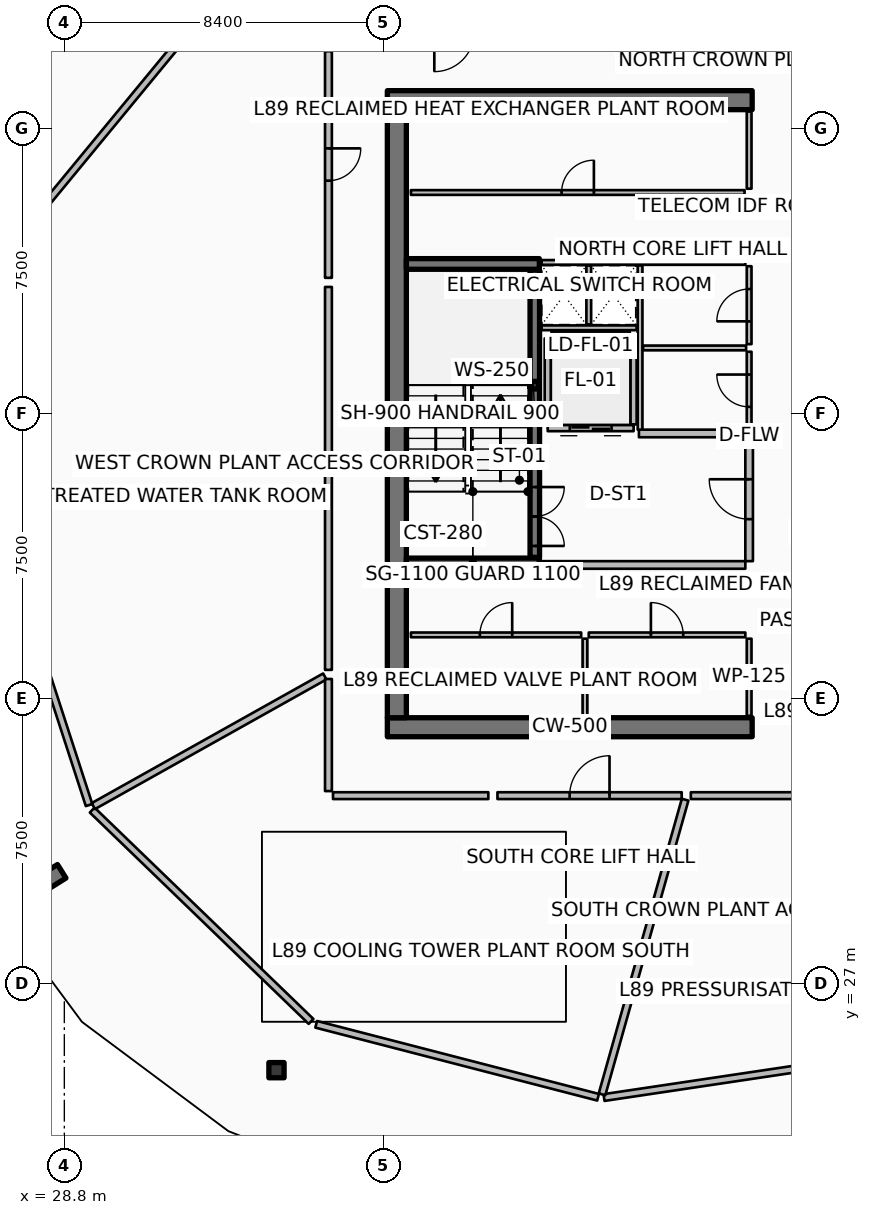
"""IFC4 building model, lengths in metres.
Left out: names, types, materials, properties, quantities, classifications, styles, units other than length and angle.
Written with IfcOpenShell. Run it as: python <this file> out.ifc"""

import sys

from ifc_helpers import new_model, si_unit, direction, frame, frame_2d, origin, origin_2d, place, context, subcontext, project, spatial, rectangle, hollow_rectangle, extrude, element, fill, save


model = new_model("IFC4")
c1 = context("Model", 3, precision=1e-05, world=origin(), true_north=direction((0.0, 1.0)))
c2 = subcontext(c1, "Body", "Model", "MODEL_VIEW")
j1 = project(units=[si_unit("LENGTHUNIT", "METRE"), si_unit("PLANEANGLEUNIT", "RADIAN")], contexts=[c1])
p1 = place(None, origin())
s1 = spatial("IfcSite", under=j1, at=p1, CompositionType="ELEMENT")
p2 = place(p1, origin())
s2 = spatial("IfcBuilding", under=s1, at=p2, CompositionType="ELEMENT")
p3 = place(p2, frame((0.0, 0.0, 356.0)))
s3 = spatial("IfcBuildingStorey", under=s2, at=p3, CompositionType="ELEMENT", Elevation=356.0)
for number, where, z_axis, x_axis in (
    (1, (37.3, 33.75, 0.0), (0.0, 0.0, 1.0), (1.0, 0.0, 0.0)),
    (2, (37.3, 50.25, 0.0), (0.0, 0.0, 1.0), (1.0, 0.0, 0.0)),
):
    element("IfcWall", number, at=place(p3, frame(where, z_axis=z_axis, x_axis=x_axis)), inside=s3, PredefinedType="SHEAR", context=c2, shape_type="SweptSolid", body=[
        extrude(rectangle(XDim=9.6, YDim=0.5, at=frame_2d((4.8, 0.0))), origin(), (0.0, 0.0, 1.0), 3.6),
    ])
p4 = place(p3, frame((37.55, 34.0, 0.0), z_axis=(0.0, 0.0, 1.0), x_axis=(0.0, 1.0, 0.0)))
e3 = element("IfcWall", 3, at=p4, inside=s3, PredefinedType="SHEAR", context=c2, shape_type="SweptSolid", body=[
    extrude(rectangle(XDim=16.0, YDim=0.5, at=frame_2d((8.0, 0.0))), origin(), (0.0, 0.0, 1.0), 3.6),
])
for number, where, z_axis, x_axis in (
    (4, (37.8, 38.06, 0.0), (0.0, 0.0, 1.0), (1.0, 0.0, 0.0)),
    (5, (37.8, 45.94, 0.0), (0.0, 0.0, 1.0), (1.0, 0.0, 0.0)),
):
    element("IfcWall", number, at=place(p3, frame(where, z_axis=z_axis, x_axis=x_axis)), inside=s3, PredefinedType="SHEAR", context=c2, shape_type="SweptSolid", body=[
        extrude(rectangle(XDim=3.5, YDim=0.28, at=frame_2d((1.75, 0.0))), origin(), (0.0, 0.0, 1.0), 3.6),
    ])
p5 = place(p3, frame((41.18, 42.75, 0.0), z_axis=(0.0, 0.0, 1.0), x_axis=(1.0, 0.0, 0.0)))
e6 = element("IfcColumn", 6, at=p5, inside=s3, PredefinedType="COLUMN", context=c2, shape_type="SweptSolid", body=[
    extrude(hollow_rectangle(XDim=0.2, YDim=0.2, WallThickness=0.01, InnerFilletRadius=0.01, OuterFilletRadius=0.02, at=origin_2d()), origin(), (0.0, 0.0, 1.0), 1.595),
])
p6 = place(p3, frame((28.731, 29.959, 0.0), z_axis=(0.0, 0.0, 1.0), x_axis=(-0.848033572426, -0.529942506352, 0.0)))
e7 = element("IfcWall", 7, at=p6, inside=s3, PredefinedType="SOLIDWALL", context=c2, shape_type="SweptSolid", body=[
    extrude(rectangle(XDim=3.5, YDim=0.42, at=frame_2d((1.75, 0.0))), origin(), (0.0, 0.0, 1.0), 3.6),
])
p7 = place(p3, frame((34.383, 24.726, 0.0), z_axis=(0.0, 0.0, 1.0), x_axis=(1.0, 0.0, 0.0)))
e8 = element("IfcColumn", 8, at=p7, inside=s3, PredefinedType="COLUMN", context=c2, shape_type="SweptSolid", body=[
    extrude(hollow_rectangle(XDim=0.4, YDim=0.4, WallThickness=0.02, InnerFilletRadius=0.02, OuterFilletRadius=0.04, at=origin_2d()), origin(), (0.0, 0.0, 1.0), 3.32),
])
p8 = place(p3, frame((41.18, 38.22, 0.0), z_axis=(0.0, 0.0, 1.0), x_axis=(0.0, 1.0, 0.0)))
e9 = element("IfcWall", 9, at=p8, inside=s3, PredefinedType="SOLIDWALL", context=c2, shape_type="SweptSolid", body=[
    extrude(rectangle(XDim=7.56, YDim=0.25, at=frame_2d((3.78, 0.0))), origin(), (0.0, 0.0, 1.0), 3.32),
])
p9 = place(p8, frame((0.3, 0.0, 0.0)))
e10 = element("IfcOpeningElement", 10, at=p9, cuts=e9, PredefinedType="OPENING", context=c2, shape_type="SweptSolid", body=[
    extrude(rectangle(XDim=1.55, YDim=2.15, at=frame_2d((0.775, 1.075))), frame((0.0, 0.135, 0.0), z_axis=(0.0, -1.0, 0.0), x_axis=(1.0, 0.0, 0.0)), (0.0, 0.0, 1.0), 0.27),
])
p10 = place(p3, frame((43.78, 41.62, 0.0), z_axis=(0.0, 0.0, 1.0), x_axis=(-1.0, 0.0, 0.0)))
e11 = element("IfcWall", 11, at=p10, inside=s3, PredefinedType="PARTITIONING", context=c2, shape_type="SweptSolid", body=[
    extrude(rectangle(XDim=2.26, YDim=0.16, at=frame_2d((1.13, 0.0))), origin(), (0.0, 0.0, 1.0), 3.32),
])
p11 = place(p10, frame((0.58, 0.0, 0.0)))
e12 = element("IfcOpeningElement", 12, at=p11, cuts=e11, PredefinedType="OPENING", context=c2, shape_type="SweptSolid", body=[
    extrude(rectangle(XDim=1.1, YDim=2.1, at=frame_2d((0.55, 1.05))), frame((0.0, 0.09, 0.0), z_axis=(0.0, -1.0, 0.0), x_axis=(1.0, 0.0, 0.0)), (0.0, 0.0, 1.0), 0.18),
])
for number, where, z_axis, x_axis in (
    (13, (43.78, 41.72, 0.0), (0.0, 0.0, 1.0), (0.0, 1.0, 0.0)),
    (14, (41.52, 41.72, 0.0), (0.0, 0.0, 1.0), (0.0, 1.0, 0.0)),
):
    element("IfcWall", number, at=place(p3, frame(where, z_axis=z_axis, x_axis=x_axis)), inside=s3, PredefinedType="PARTITIONING", context=c2, shape_type="SweptSolid", body=[
        extrude(rectangle(XDim=2.26, YDim=0.16, at=frame_2d((1.13, 0.0))), origin(), (0.0, 0.0, 1.0), 3.32),
    ])
p12 = place(p3, frame((41.62, 44.08, 0.0), z_axis=(0.0, 0.0, 1.0), x_axis=(1.0, 0.0, 0.0)))
e15 = element("IfcWall", 15, at=p12, inside=s3, PredefinedType="PARTITIONING", context=c2, shape_type="SweptSolid", body=[
    extrude(rectangle(XDim=2.06, YDim=0.16, at=frame_2d((1.03, 0.0))), origin(), (0.0, 0.0, 1.0), 3.32),
])
for number, where, z_axis, x_axis in (
    (16, (46.82, 34.05, 0.0), (0.0, 0.0, 1.0), (0.0, 1.0, 0.0)),
    (17, (42.5, 34.05, 0.0), (0.0, 0.0, 1.0), (0.0, 1.0, 0.0)),
):
    element("IfcWall", number, at=place(p3, frame(where, z_axis=z_axis, x_axis=x_axis)), inside=s3, PredefinedType="PARTITIONING", context=c2, shape_type="SweptSolid", body=[
        extrude(rectangle(XDim=2.03, YDim=0.125, at=frame_2d((1.015, 0.0))), origin(), (0.0, 0.0, 1.0), 2.76),
    ])
p13 = place(p3, frame((37.92, 36.18, 0.0), z_axis=(0.0, 0.0, 1.0), x_axis=(1.0, 0.0, 0.0)))
e18 = element("IfcWall", 18, at=p13, inside=s3, PredefinedType="PARTITIONING", context=c2, shape_type="SweptSolid", body=[
    extrude(rectangle(XDim=4.48, YDim=0.125, at=frame_2d((2.24, 0.0))), origin(), (0.0, 0.0, 1.0), 2.76),
])
p14 = place(p13, frame((1.815, 0.0, 0.0)))
e19 = element("IfcOpeningElement", 19, at=p14, cuts=e18, PredefinedType="OPENING", context=c2, shape_type="SweptSolid", body=[
    extrude(rectangle(XDim=0.85, YDim=2.06, at=frame_2d((0.425, 1.03))), frame((0.0, 0.073, 0.0), z_axis=(0.0, -1.0, 0.0), x_axis=(1.0, 0.0, 0.0)), (0.0, 0.0, 1.0), 0.145),
])
p15 = place(p3, frame((42.6, 36.18, 0.0), z_axis=(0.0, 0.0, 1.0), x_axis=(1.0, 0.0, 0.0)))
e20 = element("IfcWall", 20, at=p15, inside=s3, PredefinedType="PARTITIONING", context=c2, shape_type="SweptSolid", body=[
    extrude(rectangle(XDim=4.12, YDim=0.125, at=frame_2d((2.06, 0.0))), origin(), (0.0, 0.0, 1.0), 2.76),
])
p16 = place(p15, frame((1.635, 0.0, 0.0)))
e21 = element("IfcOpeningElement", 21, at=p16, cuts=e20, PredefinedType="OPENING", context=c2, shape_type="SweptSolid", body=[
    extrude(rectangle(XDim=0.85, YDim=2.06, at=frame_2d((0.425, 1.03))), frame((0.0, 0.073, 0.0), z_axis=(0.0, -1.0, 0.0), x_axis=(1.0, 0.0, 0.0)), (0.0, 0.0, 1.0), 0.145),
])
p17 = place(p3, frame((46.82, 47.92, 0.0), z_axis=(0.0, 0.0, 1.0), x_axis=(0.0, 1.0, 0.0)))
e22 = element("IfcWall", 22, at=p17, inside=s3, PredefinedType="PARTITIONING", context=c2, shape_type="SweptSolid", body=[
    extrude(rectangle(XDim=2.03, YDim=0.125, at=frame_2d((1.015, 0.0))), origin(), (0.0, 0.0, 1.0), 2.76),
])
p18 = place(p3, frame((37.92, 47.82, 0.0), z_axis=(0.0, 0.0, 1.0), x_axis=(1.0, 0.0, 0.0)))
e23 = element("IfcWall", 23, at=p18, inside=s3, PredefinedType="PARTITIONING", context=c2, shape_type="SweptSolid", body=[
    extrude(rectangle(XDim=8.78, YDim=0.125, at=frame_2d((4.39, 0.0))), origin(), (0.0, 0.0, 1.0), 2.76),
])
p19 = place(p18, frame((3.965, 0.0, 0.0)))
e24 = element("IfcOpeningElement", 24, at=p19, cuts=e23, PredefinedType="OPENING", context=c2, shape_type="SweptSolid", body=[
    extrude(rectangle(XDim=0.85, YDim=2.06, at=frame_2d((0.425, 1.03))), frame((0.0, 0.073, 0.0), z_axis=(0.0, -1.0, 0.0), x_axis=(1.0, 0.0, 0.0)), (0.0, 0.0, 1.0), 0.145),
])
p20 = place(p3, frame((41.35, 38.02, 0.0), z_axis=(0.0, 0.0, 1.0), x_axis=(1.0, 0.0, 0.0)))
e25 = element("IfcWall", 25, at=p20, inside=s3, PredefinedType="PARTITIONING", context=c2, shape_type="SweptSolid", body=[
    extrude(rectangle(XDim=5.37, YDim=0.2, at=frame_2d((2.685, 0.0))), origin(), (0.0, 0.0, 1.0), 3.32),
])
p21 = place(p3, frame((43.92, 41.48, 0.0), z_axis=(0.0, 0.0, 1.0), x_axis=(1.0, 0.0, 0.0)))
e26 = element("IfcWall", 26, at=p21, inside=s3, PredefinedType="PARTITIONING", context=c2, shape_type="SweptSolid", body=[
    extrude(rectangle(XDim=2.8, YDim=0.2, at=frame_2d((1.4, 0.0))), origin(), (0.0, 0.0, 1.0), 3.32),
])
p22 = place(p3, frame((46.82, 38.12, 0.0), z_axis=(0.0, 0.0, 1.0), x_axis=(0.0, 1.0, 0.0)))
e27 = element("IfcWall", 27, at=p22, inside=s3, PredefinedType="PARTITIONING", context=c2, shape_type="SweptSolid", body=[
    extrude(rectangle(XDim=3.26, YDim=0.2, at=frame_2d((1.63, 0.0))), origin(), (0.0, 0.0, 1.0), 3.32),
])
p23 = place(p22, frame((1.105, 0.0, 0.0)))
e28 = element("IfcOpeningElement", 28, at=p23, cuts=e27, PredefinedType="OPENING", context=c2, shape_type="SweptSolid", body=[
    extrude(rectangle(XDim=1.05, YDim=2.1, at=frame_2d((0.525, 1.05))), frame((0.0, 0.11, 0.0), z_axis=(0.0, -1.0, 0.0), x_axis=(1.0, 0.0, 0.0)), (0.0, 0.0, 1.0), 0.22),
])
p24 = place(p3, frame((41.36, 45.98, 0.0), z_axis=(0.0, 0.0, 1.0), x_axis=(1.0, 0.0, 0.0)))
e29 = element("IfcWall", 29, at=p24, inside=s3, PredefinedType="PARTITIONING", context=c2, shape_type="SweptSolid", body=[
    extrude(rectangle(XDim=5.36, YDim=0.125, at=frame_2d((2.68, 0.0))), origin(), (0.0, 0.0, 1.0), 2.76),
])
p25 = place(p3, frame((41.36, 44.26, 0.0), z_axis=(0.0, 0.0, 1.0), x_axis=(1.0, 0.0, 0.0)))
e30 = element("IfcWall", 30, at=p25, inside=s3, PredefinedType="PARTITIONING", context=c2, shape_type="SweptSolid", body=[
    extrude(rectangle(XDim=2.5, YDim=0.125, at=frame_2d((1.25, 0.0))), origin(), (0.0, 0.0, 1.0), 2.76),
])
p26 = place(p3, frame((42.6, 44.35, 0.0), z_axis=(0.0, 0.0, 1.0), x_axis=(0.0, 1.0, 0.0)))
e31 = element("IfcWall", 31, at=p26, inside=s3, PredefinedType="PARTITIONING", context=c2, shape_type="SweptSolid", body=[
    extrude(rectangle(XDim=1.55, YDim=0.125, at=frame_2d((0.775, 0.0))), origin(), (0.0, 0.0, 1.0), 2.76),
])
p27 = place(p3, frame((43.95, 41.58, 0.0), z_axis=(0.0, 0.0, 1.0), x_axis=(0.0, 1.0, 0.0)))
e32 = element("IfcWall", 32, at=p27, inside=s3, PredefinedType="PARTITIONING", context=c2, shape_type="SweptSolid", body=[
    extrude(rectangle(XDim=4.32, YDim=0.125, at=frame_2d((2.16, 0.0))), origin(), (0.0, 0.0, 1.0), 2.76),
])
p28 = place(p3, frame((44.03, 43.73, 0.0), z_axis=(0.0, 0.0, 1.0), x_axis=(1.0, 0.0, 0.0)))
e33 = element("IfcWall", 33, at=p28, inside=s3, PredefinedType="PARTITIONING", context=c2, shape_type="SweptSolid", body=[
    extrude(rectangle(XDim=2.71, YDim=0.125, at=frame_2d((1.355, 0.0))), origin(), (0.0, 0.0, 1.0), 2.76),
])
p29 = place(p3, frame((46.82, 41.58, 0.0), z_axis=(0.0, 0.0, 1.0), x_axis=(0.0, 1.0, 0.0)))
e34 = element("IfcWall", 34, at=p29, inside=s3, PredefinedType="PARTITIONING", context=c2, shape_type="SweptSolid", body=[
    extrude(rectangle(XDim=2.05, YDim=0.125, at=frame_2d((1.025, 0.0))), origin(), (0.0, 0.0, 1.0), 2.76),
])
p30 = place(p29, frame((0.6, 0.0, 0.0)))
e35 = element("IfcOpeningElement", 35, at=p30, cuts=e34, PredefinedType="OPENING", context=c2, shape_type="SweptSolid", body=[
    extrude(rectangle(XDim=0.85, YDim=2.06, at=frame_2d((0.425, 1.03))), frame((0.0, 0.073, 0.0), z_axis=(0.0, -1.0, 0.0), x_axis=(1.0, 0.0, 0.0)), (0.0, 0.0, 1.0), 0.145),
])
p31 = place(p3, frame((46.82, 43.83, 0.0), z_axis=(0.0, 0.0, 1.0), x_axis=(0.0, 1.0, 0.0)))
e36 = element("IfcWall", 36, at=p31, inside=s3, PredefinedType="PARTITIONING", context=c2, shape_type="SweptSolid", body=[
    extrude(rectangle(XDim=2.05, YDim=0.125, at=frame_2d((1.025, 0.0))), origin(), (0.0, 0.0, 1.0), 2.76),
])
p32 = place(p31, frame((0.6, 0.0, 0.0)))
e37 = element("IfcOpeningElement", 37, at=p32, cuts=e36, PredefinedType="OPENING", context=c2, shape_type="SweptSolid", body=[
    extrude(rectangle(XDim=0.85, YDim=2.06, at=frame_2d((0.425, 1.03))), frame((0.0, 0.073, 0.0), z_axis=(0.0, -1.0, 0.0), x_axis=(1.0, 0.0, 0.0)), (0.0, 0.0, 1.0), 0.145),
])
p33 = place(p3, frame((33.258, 53.52, 0.0), z_axis=(0.0, 0.0, 1.0), x_axis=(-0.636018833443, -0.771673534278, 0.0)))
e38 = element("IfcWall", 38, at=p33, inside=s3, PredefinedType="PARTITIONING", context=c2, shape_type="SweptSolid", body=[
    extrude(rectangle(XDim=7.661, YDim=0.18, at=frame_2d((3.831, 0.0))), origin(), (0.0, 0.0, 1.0), 2.76),
])
p34 = place(p3, frame((26.941, 39.428, 0.0), z_axis=(0.0, 0.0, 1.0), x_axis=(0.309024234991, -0.951054163646, 0.0)))
e39 = element("IfcWall", 39, at=p34, inside=s3, PredefinedType="PARTITIONING", context=c2, shape_type="SweptSolid", body=[
    extrude(rectangle(XDim=8.124, YDim=0.18, at=frame_2d((4.062, 0.0))), origin(), (0.0, 0.0, 1.0), 2.76),
])
p35 = place(p3, frame((29.533, 31.57, 0.0), z_axis=(0.0, 0.0, 1.0), x_axis=(0.719364153135, -0.694633151516, 0.0)))
e40 = element("IfcWall", 40, at=p35, inside=s3, PredefinedType="PARTITIONING", context=c2, shape_type="SweptSolid", body=[
    extrude(rectangle(XDim=8.006, YDim=0.18, at=frame_2d((4.003, 0.0))), origin(), (0.0, 0.0, 1.0), 2.76),
])
p36 = place(p3, frame((35.427, 25.934, 0.0), z_axis=(0.0, 0.0, 1.0), x_axis=(0.968117205342, -0.250497658115, 0.0)))
e41 = element("IfcWall", 41, at=p36, inside=s3, PredefinedType="PARTITIONING", context=c2, shape_type="SweptSolid", body=[
    extrude(rectangle(XDim=7.662, YDim=0.18, at=frame_2d((3.831, 0.0))), origin(), (0.0, 0.0, 1.0), 2.76),
])
p37 = place(p3, frame((43.001, 24.006, 0.0), z_axis=(0.0, 0.0, 1.0), x_axis=(0.989034336252, 0.147685753256, 0.0)))
e42 = element("IfcWall", 42, at=p37, inside=s3, PredefinedType="PARTITIONING", context=c2, shape_type="SweptSolid", body=[
    extrude(rectangle(XDim=7.003, YDim=0.18, at=frame_2d((3.501, 0.0))), origin(), (0.0, 0.0, 1.0), 2.76),
])
p38 = place(p3, frame((35.75, 51.537, 0.0), z_axis=(0.0, 0.0, 1.0), x_axis=(0.0, -1.0, 0.0)))
e43 = element("IfcWall", 43, at=p38, inside=s3, PredefinedType="PARTITIONING", context=c2, shape_type="SweptSolid", body=[
    extrude(rectangle(XDim=5.962, YDim=0.18, at=frame_2d((2.981, 0.0))), origin(), (0.0, 0.0, 1.0), 2.76),
])
p39 = place(p38, frame((2.556, 0.0, 0.0)))
e44 = element("IfcOpeningElement", 44, at=p39, cuts=e43, PredefinedType="OPENING", context=c2, shape_type="SweptSolid", body=[
    extrude(rectangle(XDim=0.85, YDim=2.06, at=frame_2d((0.425, 1.03))), frame((0.0, 0.1, 0.0), z_axis=(0.0, -1.0, 0.0), x_axis=(1.0, 0.0, 0.0)), (0.0, 0.0, 1.0), 0.2),
])
p40 = place(p3, frame((35.75, 45.335, 0.0), z_axis=(0.0, 0.0, 1.0), x_axis=(0.0, -1.0, 0.0)))
e45 = element("IfcWall", 45, at=p40, inside=s3, PredefinedType="PARTITIONING", context=c2, shape_type="SweptSolid", body=[
    extrude(rectangle(XDim=4.665, YDim=0.18, at=frame_2d((2.333, 0.0))), origin(), (0.0, 0.0, 1.0), 2.76),
])
p41 = place(p3, frame((35.75, 40.43, 0.0), z_axis=(0.0, 0.0, 1.0), x_axis=(0.0, -1.0, 0.0)))
e46 = element("IfcWall", 46, at=p41, inside=s3, PredefinedType="PARTITIONING", context=c2, shape_type="SweptSolid", body=[
    extrude(rectangle(XDim=5.17, YDim=0.18, at=frame_2d((2.585, 0.0))), origin(), (0.0, 0.0, 1.0), 2.76),
])
p42 = place(p3, frame((35.654, 35.086, 0.0), z_axis=(0.0, 0.0, 1.0), x_axis=(-0.872497667023, -0.488618277432, 0.0)))
e47 = element("IfcWall", 47, at=p42, inside=s3, PredefinedType="PARTITIONING", context=c2, shape_type="SweptSolid", body=[
    extrude(rectangle(XDim=6.981, YDim=0.18, at=frame_2d((3.491, 0.0))), origin(), (0.0, 0.0, 1.0), 2.76),
])
p43 = place(p3, frame((35.75, 35.02, 0.0), z_axis=(0.0, 0.0, 1.0), x_axis=(0.0, -1.0, 0.0)))
e48 = element("IfcWall", 48, at=p43, inside=s3, PredefinedType="PARTITIONING", context=c2, shape_type="SweptSolid", body=[
    extrude(rectangle(XDim=2.95, YDim=0.18, at=frame_2d((1.475, 0.0))), origin(), (0.0, 0.0, 1.0), 2.76),
])
p44 = place(p3, frame((35.87, 31.95, 0.0), z_axis=(0.0, 0.0, 1.0), x_axis=(1.0, 0.0, 0.0)))
e49 = element("IfcWall", 49, at=p44, inside=s3, PredefinedType="PARTITIONING", context=c2, shape_type="SweptSolid", body=[
    extrude(rectangle(XDim=4.087, YDim=0.18, at=frame_2d((2.043, 0.0))), origin(), (0.0, 0.0, 1.0), 2.76),
])
p45 = place(p3, frame((40.197, 31.95, 0.0), z_axis=(0.0, 0.0, 1.0), x_axis=(1.0, 0.0, 0.0)))
e50 = element("IfcWall", 50, at=p45, inside=s3, PredefinedType="PARTITIONING", context=c2, shape_type="SweptSolid", body=[
    extrude(rectangle(XDim=4.848, YDim=0.18, at=frame_2d((2.424, 0.0))), origin(), (0.0, 0.0, 1.0), 2.76),
])
p46 = place(p45, frame((1.899, 0.0, 0.0)))
e51 = element("IfcOpeningElement", 51, at=p46, cuts=e50, PredefinedType="OPENING", context=c2, shape_type="SweptSolid", body=[
    extrude(rectangle(XDim=1.05, YDim=2.1, at=frame_2d((0.525, 1.05))), frame((0.0, 0.1, 0.0), z_axis=(0.0, -1.0, 0.0), x_axis=(1.0, 0.0, 0.0)), (0.0, 0.0, 1.0), 0.2),
])
p47 = place(p3, frame((45.136, 31.844, 0.0), z_axis=(0.0, 0.0, 1.0), x_axis=(-0.271457285698, -0.962450488099, 0.0)))
e52 = element("IfcWall", 52, at=p47, inside=s3, PredefinedType="PARTITIONING", context=c2, shape_type="SweptSolid", body=[
    extrude(rectangle(XDim=8.056, YDim=0.18, at=frame_2d((4.028, 0.0))), origin(), (0.0, 0.0, 1.0), 2.76),
])
p48 = place(p3, frame((45.286, 31.95, 0.0), z_axis=(0.0, 0.0, 1.0), x_axis=(1.0, 0.0, 0.0)))
e53 = element("IfcWall", 53, at=p48, inside=s3, PredefinedType="PARTITIONING", context=c2, shape_type="SweptSolid", body=[
    extrude(rectangle(XDim=3.784, YDim=0.18, at=frame_2d((1.892, 0.0))), origin(), (0.0, 0.0, 1.0), 2.76),
])
p49 = place(p9, origin())
e54 = element("IfcDoor", 54, at=p49, inside=s3, OperationType="DOUBLE_DOOR_SINGLE_SWING", PredefinedType="DOOR", context=c2, shape_type="SweptSolid", body=[
    extrude(rectangle(XDim=1.55, YDim=2.15, at=frame_2d((0.775, 1.075))), frame((0.0, 0.025, 0.0), z_axis=(0.0, -1.0, 0.0), x_axis=(1.0, 0.0, 0.0)), (0.0, 0.0, 1.0), 0.05),
])
fill(e10, e54)
p50 = place(p11, origin())
e55 = element("IfcDoor", 55, at=p50, inside=s3, OperationType="DOUBLE_DOOR_SLIDING", PredefinedType="DOOR", context=c2, shape_type="SweptSolid", body=[
    extrude(rectangle(XDim=1.1, YDim=2.1, at=frame_2d((0.55, 1.05))), frame((0.0, 0.025, 0.0), z_axis=(0.0, -1.0, 0.0), x_axis=(1.0, 0.0, 0.0)), (0.0, 0.0, 1.0), 0.05),
])
fill(e12, e55)
p51 = place(p14, origin())
e56 = element("IfcDoor", 56, at=p51, inside=s3, OperationType="SINGLE_SWING_RIGHT", PredefinedType="DOOR", context=c2, shape_type="SweptSolid", body=[
    extrude(rectangle(XDim=0.85, YDim=2.06, at=frame_2d((0.425, 1.03))), frame((0.0, 0.025, 0.0), z_axis=(0.0, -1.0, 0.0), x_axis=(1.0, 0.0, 0.0)), (0.0, 0.0, 1.0), 0.05),
])
fill(e19, e56)
p52 = place(p16, origin())
e57 = element("IfcDoor", 57, at=p52, inside=s3, OperationType="SINGLE_SWING_LEFT", PredefinedType="DOOR", context=c2, shape_type="SweptSolid", body=[
    extrude(rectangle(XDim=0.85, YDim=2.06, at=frame_2d((0.425, 1.03))), frame((0.0, 0.025, 0.0), z_axis=(0.0, -1.0, 0.0), x_axis=(1.0, 0.0, 0.0)), (0.0, 0.0, 1.0), 0.05),
])
fill(e21, e57)
p53 = place(p19, origin())
e58 = element("IfcDoor", 58, at=p53, inside=s3, OperationType="SINGLE_SWING_RIGHT", PredefinedType="DOOR", context=c2, shape_type="SweptSolid", body=[
    extrude(rectangle(XDim=0.85, YDim=2.06, at=frame_2d((0.425, 1.03))), frame((0.0, 0.025, 0.0), z_axis=(0.0, -1.0, 0.0), x_axis=(1.0, 0.0, 0.0)), (0.0, 0.0, 1.0), 0.05),
])
fill(e24, e58)
p54 = place(p23, origin())
e59 = element("IfcDoor", 59, at=p54, inside=s3, OperationType="SINGLE_SWING_RIGHT", PredefinedType="DOOR", context=c2, shape_type="SweptSolid", body=[
    extrude(rectangle(XDim=1.05, YDim=2.1, at=frame_2d((0.525, 1.05))), frame((0.0, 0.025, 0.0), z_axis=(0.0, -1.0, 0.0), x_axis=(1.0, 0.0, 0.0)), (0.0, 0.0, 1.0), 0.05),
])
fill(e28, e59)
p55 = place(p30, origin())
e60 = element("IfcDoor", 60, at=p55, inside=s3, OperationType="SINGLE_SWING_RIGHT", PredefinedType="DOOR", context=c2, shape_type="SweptSolid", body=[
    extrude(rectangle(XDim=0.85, YDim=2.06, at=frame_2d((0.425, 1.03))), frame((0.0, 0.025, 0.0), z_axis=(0.0, -1.0, 0.0), x_axis=(1.0, 0.0, 0.0)), (0.0, 0.0, 1.0), 0.05),
])
fill(e35, e60)
p56 = place(p32, origin())
e61 = element("IfcDoor", 61, at=p56, inside=s3, OperationType="SINGLE_SWING_LEFT", PredefinedType="DOOR", context=c2, shape_type="SweptSolid", body=[
    extrude(rectangle(XDim=0.85, YDim=2.06, at=frame_2d((0.425, 1.03))), frame((0.0, 0.025, 0.0), z_axis=(0.0, -1.0, 0.0), x_axis=(1.0, 0.0, 0.0)), (0.0, 0.0, 1.0), 0.05),
])
fill(e37, e61)
p57 = place(p39, origin())
e62 = element("IfcDoor", 62, at=p57, inside=s3, OperationType="SINGLE_SWING_LEFT", PredefinedType="DOOR", context=c2, shape_type="SweptSolid", body=[
    extrude(rectangle(XDim=0.85, YDim=2.06, at=frame_2d((0.425, 1.03))), frame((0.0, 0.025, 0.0), z_axis=(0.0, -1.0, 0.0), x_axis=(1.0, 0.0, 0.0)), (0.0, 0.0, 1.0), 0.05),
])
fill(e44, e62)
p58 = place(p46, origin())
e63 = element("IfcDoor", 63, at=p58, inside=s3, OperationType="SINGLE_SWING_RIGHT", PredefinedType="DOOR", context=c2, shape_type="SweptSolid", body=[
    extrude(rectangle(XDim=1.05, YDim=2.1, at=frame_2d((0.525, 1.05))), frame((0.0, 0.025, 0.0), z_axis=(0.0, -1.0, 0.0), x_axis=(1.0, 0.0, 0.0)), (0.0, 0.0, 1.0), 0.05),
])
fill(e51, e63)
save(model, sys.argv[1])
